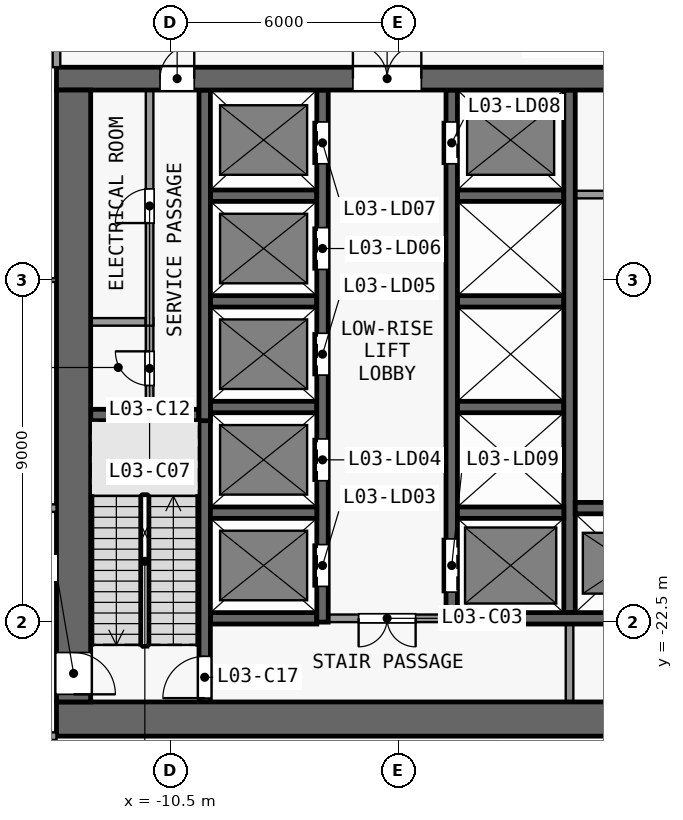
"""IFC4 building model, lengths in metres.
Left out: names, types, materials, properties, quantities, classifications, styles, units other than length and angle.
Written with IfcOpenShell. Run it as: python <this file> out.ifc"""

import sys

from ifc_helpers import new_model, si_unit, direction, frame, frame_2d, origin, place, context, subcontext, project, spatial, rectangle, extrude, element, fill, save


model = new_model("IFC4")
c1 = context("Model", 3, precision=1e-05, world=origin(), true_north=direction((0.0, 1.0)))
c2 = subcontext(c1, "Body", "Model", "MODEL_VIEW")
j1 = project(units=[si_unit("LENGTHUNIT", "METRE"), si_unit("PLANEANGLEUNIT", "RADIAN")], contexts=[c1])
p1 = place(None, origin())
s1 = spatial("IfcSite", under=j1, at=p1, CompositionType="ELEMENT")
p2 = place(p1, origin())
s2 = spatial("IfcBuilding", under=s1, at=p2, CompositionType="ELEMENT")
p3 = place(p2, frame((0.0, 0.0, 18.5)))
s3 = spatial("IfcBuildingStorey", under=s2, at=p3, CompositionType="ELEMENT", Elevation=18.5)
p4 = place(p3, frame((-13.5, -25.05, 0.0), z_axis=(0.0, 0.0, 1.0), x_axis=(1.0, 0.0, 0.0)))
e1 = element("IfcWall", 1, at=p4, inside=s3, PredefinedType="SHEAR", context=c2, shape_type="SweptSolid", body=[
    extrude(rectangle(XDim=27.0, YDim=0.9, at=frame_2d((13.5, 0.0))), origin(), (0.0, 0.0, 1.0), 4.65),
])
p5 = place(p3, frame((-13.5, -8.2, 0.0), z_axis=(0.0, 0.0, 1.0), x_axis=(1.0, 0.0, 0.0)))
e2 = element("IfcWall", 2, at=p5, inside=s3, PredefinedType="SHEAR", context=c2, shape_type="SweptSolid", body=[
    extrude(rectangle(XDim=27.0, YDim=0.6, at=frame_2d((13.5, 0.0))), origin(), (0.0, 0.0, 1.0), 4.65),
])
p6 = place(p5, frame((7.8, 0.0, 0.0)))
e3 = element("IfcOpeningElement", 3, at=p6, cuts=e2, PredefinedType="OPENING", context=c2, shape_type="SweptSolid", body=[
    extrude(rectangle(XDim=1.8, YDim=2.1, at=frame_2d((0.9, 1.05))), frame((0.0, 0.31, 0.0), z_axis=(0.0, -1.0, 0.0), x_axis=(1.0, 0.0, 0.0)), (0.0, 0.0, 1.0), 0.62),
])
p7 = place(p5, frame((17.4, 0.0, 0.0)))
e4 = element("IfcOpeningElement", 4, at=p7, cuts=e2, PredefinedType="OPENING", context=c2, shape_type="SweptSolid", body=[
    extrude(rectangle(XDim=1.8, YDim=2.1, at=frame_2d((0.9, 1.05))), frame((0.0, 0.31, 0.0), z_axis=(0.0, -1.0, 0.0), x_axis=(1.0, 0.0, 0.0)), (0.0, 0.0, 1.0), 0.62),
])
p8 = place(p5, frame((2.725, 0.0, 0.0)))
e5 = element("IfcOpeningElement", 5, at=p8, cuts=e2, PredefinedType="OPENING", context=c2, shape_type="SweptSolid", body=[
    extrude(rectangle(XDim=0.9, YDim=2.1, at=frame_2d((0.45, 1.05))), frame((0.0, 0.31, 0.0), z_axis=(0.0, -1.0, 0.0), x_axis=(1.0, 0.0, 0.0)), (0.0, 0.0, 1.0), 0.62),
])
p9 = place(p5, frame((23.375, 0.0, 0.0)))
e6 = element("IfcOpeningElement", 6, at=p9, cuts=e2, PredefinedType="OPENING", context=c2, shape_type="SweptSolid", body=[
    extrude(rectangle(XDim=0.9, YDim=2.1, at=frame_2d((0.45, 1.05))), frame((0.0, 0.31, 0.0), z_axis=(0.0, -1.0, 0.0), x_axis=(1.0, 0.0, 0.0)), (0.0, 0.0, 1.0), 0.62),
])
p10 = place(p3, frame((-13.05, -8.5, 0.0), z_axis=(0.0, 0.0, 1.0), x_axis=(0.0, -1.0, 0.0)))
e7 = element("IfcWall", 7, at=p10, inside=s3, PredefinedType="SHEAR", context=c2, shape_type="SweptSolid", body=[
    extrude(rectangle(XDim=16.1, YDim=0.9, at=frame_2d((8.05, 0.0))), origin(), (0.0, 0.0, 1.0), 4.65),
])
p11 = place(p10, frame((14.8, 0.0, 0.0)))
e8 = element("IfcOpeningElement", 8, at=p11, cuts=e7, PredefinedType="OPENING", context=c2, shape_type="SweptSolid", body=[
    extrude(rectangle(XDim=1.1, YDim=2.1, at=frame_2d((0.55, 1.05))), frame((0.0, 0.46, 0.0), z_axis=(0.0, -1.0, 0.0), x_axis=(1.0, 0.0, 0.0)), (0.0, 0.0, 1.0), 0.92),
])
p12 = place(p3, frame((-9.45, -22.4, 0.0), z_axis=(0.0, 0.0, 1.0), x_axis=(1.0, 0.0, 0.0)))
e9 = element("IfcWall", 9, at=p12, inside=s3, PredefinedType="SHEAR", context=c2, shape_type="SweptSolid", body=[
    extrude(rectangle(XDim=2.8, YDim=0.3, at=frame_2d((1.4, 0.0))), origin(), (0.0, 0.0, 1.0), 4.65),
])
p13 = place(p3, frame((-3.25, -22.4, 0.0), z_axis=(0.0, 0.0, 1.0), x_axis=(-1.0, 0.0, 0.0)))
e10 = element("IfcWall", 10, at=p13, inside=s3, PredefinedType="PARTITIONING", context=c2, shape_type="SweptSolid", body=[
    extrude(rectangle(XDim=3.1, YDim=0.2, at=frame_2d((1.55, 0.0))), origin(), (0.0, 0.0, 1.0), 4.65),
])
p14 = place(p13, frame((0.8, 0.0, 0.0)))
e11 = element("IfcOpeningElement", 11, at=p14, cuts=e10, PredefinedType="OPENING", context=c2, shape_type="SweptSolid", body=[
    extrude(rectangle(XDim=1.5, YDim=2.1, at=frame_2d((0.75, 1.05))), frame((0.0, 0.11, 0.0), z_axis=(0.0, -1.0, 0.0), x_axis=(1.0, 0.0, 0.0)), (0.0, 0.0, 1.0), 0.22),
])
p15 = place(p3, frame((-2.95, -22.4, 0.0), z_axis=(0.0, 0.0, 1.0), x_axis=(1.0, 0.0, 0.0)))
e12 = element("IfcWall", 12, at=p15, inside=s3, PredefinedType="SHEAR", context=c2, shape_type="SweptSolid", body=[
    extrude(rectangle(XDim=6.2, YDim=0.3, at=frame_2d((3.1, 0.0))), origin(), (0.0, 0.0, 1.0), 4.65),
])
for number, where, z_axis, x_axis in (
    (13, (-9.45, -19.62, 0.0), (0.0, 0.0, 1.0), (1.0, 0.0, 0.0)),
    (14, (-2.95, -19.62, 0.0), (0.0, 0.0, 1.0), (1.0, 0.0, 0.0)),
):
    element("IfcWall", number, at=place(p3, frame(where, z_axis=z_axis, x_axis=x_axis)), inside=s3, PredefinedType="SHEAR", context=c2, shape_type="SweptSolid", body=[
        extrude(rectangle(XDim=2.8, YDim=0.3, at=frame_2d((1.4, 0.0))), origin(), (0.0, 0.0, 1.0), 4.65),
    ])
p16 = place(p3, frame((0.15, -19.5, 0.0), z_axis=(0.0, 0.0, 1.0), x_axis=(1.0, 0.0, 0.0)))
e15 = element("IfcWall", 15, at=p16, inside=s3, PredefinedType="SHEAR", context=c2, shape_type="SweptSolid", body=[
    extrude(rectangle(XDim=3.05, YDim=0.3, at=frame_2d((1.525, 0.0))), origin(), (0.0, 0.0, 1.0), 4.65),
])
p17 = place(p3, frame((-12.6, -17.05, 0.0), z_axis=(0.0, 0.0, 1.0), x_axis=(1.0, 0.0, 0.0)))
e16 = element("IfcWall", 16, at=p17, inside=s3, PredefinedType="SHEAR", context=c2, shape_type="SweptSolid", body=[
    extrude(rectangle(XDim=2.85, YDim=0.3, at=frame_2d((1.425, 0.0))), origin(), (0.0, 0.0, 1.0), 4.65),
])
for number, where, z_axis, x_axis in (
    (17, (-9.45, -16.84, 0.0), (0.0, 0.0, 1.0), (1.0, 0.0, 0.0)),
    (18, (-2.95, -16.84, 0.0), (0.0, 0.0, 1.0), (1.0, 0.0, 0.0)),
):
    element("IfcWall", number, at=place(p3, frame(where, z_axis=z_axis, x_axis=x_axis)), inside=s3, PredefinedType="SHEAR", context=c2, shape_type="SweptSolid", body=[
        extrude(rectangle(XDim=2.8, YDim=0.3, at=frame_2d((1.4, 0.0))), origin(), (0.0, 0.0, 1.0), 4.65),
    ])
p18 = place(p3, frame((-12.6, -14.6, 0.0), z_axis=(0.0, 0.0, 1.0), x_axis=(1.0, 0.0, 0.0)))
e19 = element("IfcWall", 19, at=p18, inside=s3, PredefinedType="PARTITIONING", context=c2, shape_type="SweptSolid", body=[
    extrude(rectangle(XDim=1.45, YDim=0.2, at=frame_2d((0.725, 0.0))), origin(), (0.0, 0.0, 1.0), 4.65),
])
for number, where, z_axis, x_axis in (
    (20, (-9.45, -14.06, 0.0), (0.0, 0.0, 1.0), (1.0, 0.0, 0.0)),
    (21, (-2.95, -14.06, 0.0), (0.0, 0.0, 1.0), (1.0, 0.0, 0.0)),
    (22, (-9.45, -11.28, 0.0), (0.0, 0.0, 1.0), (1.0, 0.0, 0.0)),
    (23, (-2.95, -11.28, 0.0), (0.0, 0.0, 1.0), (1.0, 0.0, 0.0)),
):
    element("IfcWall", number, at=place(p3, frame(where, z_axis=z_axis, x_axis=x_axis)), inside=s3, PredefinedType="SHEAR", context=c2, shape_type="SweptSolid", body=[
        extrude(rectangle(XDim=2.8, YDim=0.3, at=frame_2d((1.4, 0.0))), origin(), (0.0, 0.0, 1.0), 4.65),
    ])
p19 = place(p3, frame((0.15, -11.25, 0.0), z_axis=(0.0, 0.0, 1.0), x_axis=(1.0, 0.0, 0.0)))
e24 = element("IfcWall", 24, at=p19, inside=s3, PredefinedType="PARTITIONING", context=c2, shape_type="SweptSolid", body=[
    extrude(rectangle(XDim=3.025, YDim=0.2, at=frame_2d((1.513, 0.0))), origin(), (0.0, 0.0, 1.0), 4.65),
])
p20 = place(p3, frame((-11.05, -16.9, 0.0), z_axis=(0.0, 0.0, 1.0), x_axis=(0.0, 1.0, 0.0)))
e25 = element("IfcWall", 25, at=p20, inside=s3, PredefinedType="PARTITIONING", context=c2, shape_type="SweptSolid", body=[
    extrude(rectangle(XDim=2.4, YDim=0.2, at=frame_2d((1.2, 0.0))), origin(), (0.0, 0.0, 1.0), 4.65),
])
p21 = place(p20, frame((0.625, 0.0, 0.0)))
e26 = element("IfcOpeningElement", 26, at=p21, cuts=e25, PredefinedType="OPENING", context=c2, shape_type="SweptSolid", body=[
    extrude(rectangle(XDim=0.9, YDim=2.1, at=frame_2d((0.45, 1.05))), frame((0.0, 0.11, 0.0), z_axis=(0.0, -1.0, 0.0), x_axis=(1.0, 0.0, 0.0)), (0.0, 0.0, 1.0), 0.22),
])
p22 = place(p3, frame((-11.05, -14.7, 0.0), z_axis=(0.0, 0.0, 1.0), x_axis=(0.0, 1.0, 0.0)))
e27 = element("IfcWall", 27, at=p22, inside=s3, PredefinedType="PARTITIONING", context=c2, shape_type="SweptSolid", body=[
    extrude(rectangle(XDim=6.2, YDim=0.2, at=frame_2d((3.1, 0.0))), origin(), (0.0, 0.0, 1.0), 4.65),
])
p23 = place(p22, frame((2.7, 0.0, 0.0)))
e28 = element("IfcOpeningElement", 28, at=p23, cuts=e27, PredefinedType="OPENING", context=c2, shape_type="SweptSolid", body=[
    extrude(rectangle(XDim=0.9, YDim=2.1, at=frame_2d((0.45, 1.05))), frame((0.0, 0.11, 0.0), z_axis=(0.0, -1.0, 0.0), x_axis=(1.0, 0.0, 0.0)), (0.0, 0.0, 1.0), 0.22),
])
p24 = place(p3, frame((-9.6, -24.6, 0.0), z_axis=(0.0, 0.0, 1.0), x_axis=(0.0, 1.0, 0.0)))
e29 = element("IfcWall", 29, at=p24, inside=s3, PredefinedType="SHEAR", context=c2, shape_type="SweptSolid", body=[
    extrude(rectangle(XDim=7.7, YDim=0.3, at=frame_2d((3.85, 0.0))), origin(), (0.0, 0.0, 1.0), 4.65),
])
p25 = place(p24, frame((0.1, 0.0, 0.0)))
e30 = element("IfcOpeningElement", 30, at=p25, cuts=e29, PredefinedType="OPENING", context=c2, shape_type="SweptSolid", body=[
    extrude(rectangle(XDim=1.1, YDim=2.1, at=frame_2d((0.55, 1.05))), frame((0.0, 0.16, 0.0), z_axis=(0.0, -1.0, 0.0), x_axis=(1.0, 0.0, 0.0)), (0.0, 0.0, 1.0), 0.32),
])
p26 = place(p3, frame((-9.6, -17.2, 0.0), z_axis=(0.0, 0.0, 1.0), x_axis=(0.0, 1.0, 0.0)))
e31 = element("IfcWall", 31, at=p26, inside=s3, PredefinedType="SHEAR", context=c2, shape_type="SweptSolid", body=[
    extrude(rectangle(XDim=8.7, YDim=0.3, at=frame_2d((4.35, 0.0))), origin(), (0.0, 0.0, 1.0), 4.65),
])
p27 = place(p3, frame((-6.5, -22.5, 0.0), z_axis=(0.0, 0.0, 1.0), x_axis=(0.0, 1.0, 0.0)))
e32 = element("IfcWall", 32, at=p27, inside=s3, PredefinedType="SHEAR", context=c2, shape_type="SweptSolid", body=[
    extrude(rectangle(XDim=14.0, YDim=0.3, at=frame_2d((7.0, 0.0))), origin(), (0.0, 0.0, 1.0), 4.65),
])
p28 = place(p27, frame((0.94, 0.0, 0.0)))
e33 = element("IfcOpeningElement", 33, at=p28, cuts=e32, PredefinedType="OPENING", context=c2, shape_type="SweptSolid", body=[
    extrude(rectangle(XDim=1.1, YDim=2.1, at=frame_2d((0.55, 1.05))), frame((0.0, 0.16, 0.0), z_axis=(0.0, -1.0, 0.0), x_axis=(1.0, 0.0, 0.0)), (0.0, 0.0, 1.0), 0.32),
])
p29 = place(p27, frame((3.72, 0.0, 0.0)))
e34 = element("IfcOpeningElement", 34, at=p29, cuts=e32, PredefinedType="OPENING", context=c2, shape_type="SweptSolid", body=[
    extrude(rectangle(XDim=1.1, YDim=2.1, at=frame_2d((0.55, 1.05))), frame((0.0, 0.16, 0.0), z_axis=(0.0, -1.0, 0.0), x_axis=(1.0, 0.0, 0.0)), (0.0, 0.0, 1.0), 0.32),
])
p30 = place(p27, frame((6.5, 0.0, 0.0)))
e35 = element("IfcOpeningElement", 35, at=p30, cuts=e32, PredefinedType="OPENING", context=c2, shape_type="SweptSolid", body=[
    extrude(rectangle(XDim=1.1, YDim=2.1, at=frame_2d((0.55, 1.05))), frame((0.0, 0.16, 0.0), z_axis=(0.0, -1.0, 0.0), x_axis=(1.0, 0.0, 0.0)), (0.0, 0.0, 1.0), 0.32),
])
p31 = place(p27, frame((9.28, 0.0, 0.0)))
e36 = element("IfcOpeningElement", 36, at=p31, cuts=e32, PredefinedType="OPENING", context=c2, shape_type="SweptSolid", body=[
    extrude(rectangle(XDim=1.1, YDim=2.1, at=frame_2d((0.55, 1.05))), frame((0.0, 0.16, 0.0), z_axis=(0.0, -1.0, 0.0), x_axis=(1.0, 0.0, 0.0)), (0.0, 0.0, 1.0), 0.32),
])
p32 = place(p27, frame((12.06, 0.0, 0.0)))
e37 = element("IfcOpeningElement", 37, at=p32, cuts=e32, PredefinedType="OPENING", context=c2, shape_type="SweptSolid", body=[
    extrude(rectangle(XDim=1.1, YDim=2.1, at=frame_2d((0.55, 1.05))), frame((0.0, 0.16, 0.0), z_axis=(0.0, -1.0, 0.0), x_axis=(1.0, 0.0, 0.0)), (0.0, 0.0, 1.0), 0.32),
])
p33 = place(p3, frame((-3.1, -22.55, 0.0), z_axis=(0.0, 0.0, 1.0), x_axis=(0.0, 1.0, 0.0)))
e38 = element("IfcWall", 38, at=p33, inside=s3, PredefinedType="SHEAR", context=c2, shape_type="SweptSolid", body=[
    extrude(rectangle(XDim=14.05, YDim=0.3, at=frame_2d((7.025, 0.0))), origin(), (0.0, 0.0, 1.0), 4.65),
])
p34 = place(p33, frame((12.11, 0.0, 0.0)))
e39 = element("IfcOpeningElement", 39, at=p34, cuts=e38, PredefinedType="OPENING", context=c2, shape_type="SweptSolid", body=[
    extrude(rectangle(XDim=1.1, YDim=2.1, at=frame_2d((0.55, 1.05))), frame((0.0, 0.16, 0.0), z_axis=(0.0, -1.0, 0.0), x_axis=(1.0, 0.0, 0.0)), (0.0, 0.0, 1.0), 0.32),
])
p35 = place(p33, frame((0.84, 0.0, 0.0)))
e40 = element("IfcOpeningElement", 40, at=p35, cuts=e38, PredefinedType="OPENING", context=c2, shape_type="SweptSolid", body=[
    extrude(rectangle(XDim=1.4, YDim=2.1, at=frame_2d((0.7, 1.05))), frame((0.0, 0.16, 0.0), z_axis=(0.0, -1.0, 0.0), x_axis=(1.0, 0.0, 0.0)), (0.0, 0.0, 1.0), 0.32),
])
p36 = place(p3, frame((0.0, -24.6, 0.0), z_axis=(0.0, 0.0, 1.0), x_axis=(0.0, 1.0, 0.0)))
e41 = element("IfcWall", 41, at=p36, inside=s3, PredefinedType="PARTITIONING", context=c2, shape_type="SweptSolid", body=[
    extrude(rectangle(XDim=2.05, YDim=0.2, at=frame_2d((1.025, 0.0))), origin(), (0.0, 0.0, 1.0), 4.65),
])
p37 = place(p3, frame((0.0, -22.25, 0.0), z_axis=(0.0, 0.0, 1.0), x_axis=(0.0, 1.0, 0.0)))
e42 = element("IfcWall", 42, at=p37, inside=s3, PredefinedType="SHEAR", context=c2, shape_type="SweptSolid", body=[
    extrude(rectangle(XDim=13.75, YDim=0.3, at=frame_2d((6.875, 0.0))), origin(), (0.0, 0.0, 1.0), 4.65),
])
p38 = place(p3, frame((-17.6, -25.5, 0.0), z_axis=(0.0, 0.0, 1.0), x_axis=(1.0, 0.0, 0.0)))
e43 = element("IfcWall", 43, at=p38, inside=s3, PredefinedType="PARTITIONING", context=c2, shape_type="SweptSolid", body=[
    extrude(rectangle(XDim=4.1, YDim=0.2, at=frame_2d((2.05, 0.0))), origin(), (0.0, 0.0, 1.0), 4.65),
])
p39 = place(p3, frame((-31.6, -19.5, 0.0), z_axis=(0.0, 0.0, 1.0), x_axis=(1.0, 0.0, 0.0)))
e44 = element("IfcWall", 44, at=p39, inside=s3, PredefinedType="PARTITIONING", context=c2, shape_type="SweptSolid", body=[
    extrude(rectangle(XDim=18.1, YDim=0.2, at=frame_2d((9.05, 0.0))), origin(), (0.0, 0.0, 1.0), 4.65),
])
p40 = place(p39, frame((3.2, 0.0, 0.0)))
e45 = element("IfcOpeningElement", 45, at=p40, cuts=e44, PredefinedType="OPENING", context=c2, shape_type="SweptSolid", body=[
    extrude(rectangle(XDim=1.0, YDim=2.1, at=frame_2d((0.5, 1.05))), frame((0.0, 0.11, 0.0), z_axis=(0.0, -1.0, 0.0), x_axis=(1.0, 0.0, 0.0)), (0.0, 0.0, 1.0), 0.22),
])
p41 = place(p39, frame((14.0, 0.0, 0.0)))
e46 = element("IfcOpeningElement", 46, at=p41, cuts=e44, PredefinedType="OPENING", context=c2, shape_type="SweptSolid", body=[
    extrude(rectangle(XDim=1.0, YDim=2.1, at=frame_2d((0.5, 1.05))), frame((0.0, 0.11, 0.0), z_axis=(0.0, -1.0, 0.0), x_axis=(1.0, 0.0, 0.0)), (0.0, 0.0, 1.0), 0.22),
])
p42 = place(p3, frame((-31.4, -13.5, 0.0), z_axis=(0.0, 0.0, 1.0), x_axis=(1.0, 0.0, 0.0)))
e47 = element("IfcWall", 47, at=p42, inside=s3, PredefinedType="PARTITIONING", context=c2, shape_type="SweptSolid", body=[
    extrude(rectangle(XDim=17.9, YDim=0.1, at=frame_2d((8.95, 0.0))), origin(), (0.0, 0.0, 1.0), 4.65),
])
p43 = place(p3, frame((-13.5, -7.9, 0.0), z_axis=(0.0, 0.0, 1.0), x_axis=(0.0, 1.0, 0.0)))
e48 = element("IfcWall", 48, at=p43, inside=s3, PredefinedType="PARTITIONING", context=c2, shape_type="SweptSolid", body=[
    extrude(rectangle(XDim=3.3, YDim=0.2, at=frame_2d((1.65, 0.0))), origin(), (0.0, 0.0, 1.0), 4.65),
])
p44 = place(p28, origin())
e49 = element("IfcDoor", 49, at=p44, inside=s3, OperationType="DOUBLE_DOOR_SLIDING", PredefinedType="DOOR", context=c2, shape_type="SweptSolid", body=[
    extrude(rectangle(XDim=1.1, YDim=2.1, at=frame_2d((0.55, 1.05))), frame((0.0, 0.025, 0.0), z_axis=(0.0, -1.0, 0.0), x_axis=(1.0, 0.0, 0.0)), (0.0, 0.0, 1.0), 0.05),
])
fill(e33, e49)
p45 = place(p29, origin())
e50 = element("IfcDoor", 50, at=p45, inside=s3, OperationType="DOUBLE_DOOR_SLIDING", PredefinedType="DOOR", context=c2, shape_type="SweptSolid", body=[
    extrude(rectangle(XDim=1.1, YDim=2.1, at=frame_2d((0.55, 1.05))), frame((0.0, 0.025, 0.0), z_axis=(0.0, -1.0, 0.0), x_axis=(1.0, 0.0, 0.0)), (0.0, 0.0, 1.0), 0.05),
])
fill(e34, e50)
p46 = place(p30, origin())
e51 = element("IfcDoor", 51, at=p46, inside=s3, OperationType="DOUBLE_DOOR_SLIDING", PredefinedType="DOOR", context=c2, shape_type="SweptSolid", body=[
    extrude(rectangle(XDim=1.1, YDim=2.1, at=frame_2d((0.55, 1.05))), frame((0.0, 0.025, 0.0), z_axis=(0.0, -1.0, 0.0), x_axis=(1.0, 0.0, 0.0)), (0.0, 0.0, 1.0), 0.05),
])
fill(e35, e51)
p47 = place(p31, origin())
e52 = element("IfcDoor", 52, at=p47, inside=s3, OperationType="DOUBLE_DOOR_SLIDING", PredefinedType="DOOR", context=c2, shape_type="SweptSolid", body=[
    extrude(rectangle(XDim=1.1, YDim=2.1, at=frame_2d((0.55, 1.05))), frame((0.0, 0.025, 0.0), z_axis=(0.0, -1.0, 0.0), x_axis=(1.0, 0.0, 0.0)), (0.0, 0.0, 1.0), 0.05),
])
fill(e36, e52)
p48 = place(p32, origin())
e53 = element("IfcDoor", 53, at=p48, inside=s3, OperationType="DOUBLE_DOOR_SLIDING", PredefinedType="DOOR", context=c2, shape_type="SweptSolid", body=[
    extrude(rectangle(XDim=1.1, YDim=2.1, at=frame_2d((0.55, 1.05))), frame((0.0, 0.025, 0.0), z_axis=(0.0, -1.0, 0.0), x_axis=(1.0, 0.0, 0.0)), (0.0, 0.0, 1.0), 0.05),
])
fill(e37, e53)
p49 = place(p34, origin())
e54 = element("IfcDoor", 54, at=p49, inside=s3, OperationType="DOUBLE_DOOR_SLIDING", PredefinedType="DOOR", context=c2, shape_type="SweptSolid", body=[
    extrude(rectangle(XDim=1.1, YDim=2.1, at=frame_2d((0.55, 1.05))), frame((0.0, 0.025, 0.0), z_axis=(0.0, -1.0, 0.0), x_axis=(1.0, 0.0, 0.0)), (0.0, 0.0, 1.0), 0.05),
])
fill(e39, e54)
p50 = place(p35, origin())
e55 = element("IfcDoor", 55, at=p50, inside=s3, OperationType="DOUBLE_DOOR_SLIDING", PredefinedType="DOOR", context=c2, shape_type="SweptSolid", body=[
    extrude(rectangle(XDim=1.4, YDim=2.1, at=frame_2d((0.7, 1.05))), frame((0.0, 0.025, 0.0), z_axis=(0.0, -1.0, 0.0), x_axis=(1.0, 0.0, 0.0)), (0.0, 0.0, 1.0), 0.05),
])
fill(e40, e55)
p51 = place(p14, origin())
e56 = element("IfcDoor", 56, at=p51, inside=s3, OperationType="DOUBLE_DOOR_SINGLE_SWING", PredefinedType="DOOR", context=c2, shape_type="SweptSolid", body=[
    extrude(rectangle(XDim=1.5, YDim=2.1, at=frame_2d((0.75, 1.05))), frame((0.0, 0.025, 0.0), z_axis=(0.0, -1.0, 0.0), x_axis=(1.0, 0.0, 0.0)), (0.0, 0.0, 1.0), 0.05),
])
fill(e11, e56)
p52 = place(p6, origin())
e57 = element("IfcDoor", 57, at=p52, inside=s3, OperationType="DOUBLE_DOOR_SINGLE_SWING", PredefinedType="DOOR", context=c2, shape_type="SweptSolid", body=[
    extrude(rectangle(XDim=1.8, YDim=2.1, at=frame_2d((0.9, 1.05))), frame((0.0, 0.025, 0.0), z_axis=(0.0, -1.0, 0.0), x_axis=(1.0, 0.0, 0.0)), (0.0, 0.0, 1.0), 0.05),
])
fill(e3, e57)
p53 = place(p23, origin())
e58 = element("IfcDoor", 58, at=p53, inside=s3, OperationType="SINGLE_SWING_LEFT", PredefinedType="DOOR", context=c2, shape_type="SweptSolid", body=[
    extrude(rectangle(XDim=0.9, YDim=2.1, at=frame_2d((0.45, 1.05))), frame((0.0, 0.025, 0.0), z_axis=(0.0, -1.0, 0.0), x_axis=(1.0, 0.0, 0.0)), (0.0, 0.0, 1.0), 0.05),
])
fill(e28, e58)
p54 = place(p8, origin())
e59 = element("IfcDoor", 59, at=p54, inside=s3, OperationType="SINGLE_SWING_RIGHT", PredefinedType="DOOR", context=c2, shape_type="SweptSolid", body=[
    extrude(rectangle(XDim=0.9, YDim=2.1, at=frame_2d((0.45, 1.05))), frame((0.0, 0.025, 0.0), z_axis=(0.0, -1.0, 0.0), x_axis=(1.0, 0.0, 0.0)), (0.0, 0.0, 1.0), 0.05),
])
fill(e5, e59)
p55 = place(p21, origin())
e60 = element("IfcDoor", 60, at=p55, inside=s3, OperationType="SINGLE_SWING_RIGHT", PredefinedType="DOOR", context=c2, shape_type="SweptSolid", body=[
    extrude(rectangle(XDim=0.9, YDim=2.1, at=frame_2d((0.45, 1.05))), frame((0.0, 0.025, 0.0), z_axis=(0.0, -1.0, 0.0), x_axis=(1.0, 0.0, 0.0)), (0.0, 0.0, 1.0), 0.05),
])
fill(e26, e60)
p56 = place(p25, origin())
e61 = element("IfcDoor", 61, at=p56, inside=s3, OperationType="SINGLE_SWING_LEFT", PredefinedType="DOOR", context=c2, shape_type="SweptSolid", body=[
    extrude(rectangle(XDim=1.1, YDim=2.1, at=frame_2d((0.55, 1.05))), frame((0.0, 0.025, 0.0), z_axis=(0.0, -1.0, 0.0), x_axis=(1.0, 0.0, 0.0)), (0.0, 0.0, 1.0), 0.05),
])
fill(e30, e61)
p57 = place(p11, origin())
e62 = element("IfcDoor", 62, at=p57, inside=s3, OperationType="SINGLE_SWING_RIGHT", PredefinedType="DOOR", context=c2, shape_type="SweptSolid", body=[
    extrude(rectangle(XDim=1.1, YDim=2.1, at=frame_2d((0.55, 1.05))), frame((0.0, 0.025, 0.0), z_axis=(0.0, -1.0, 0.0), x_axis=(1.0, 0.0, 0.0)), (0.0, 0.0, 1.0), 0.05),
])
fill(e8, e62)
save(model, sys.argv[1])
